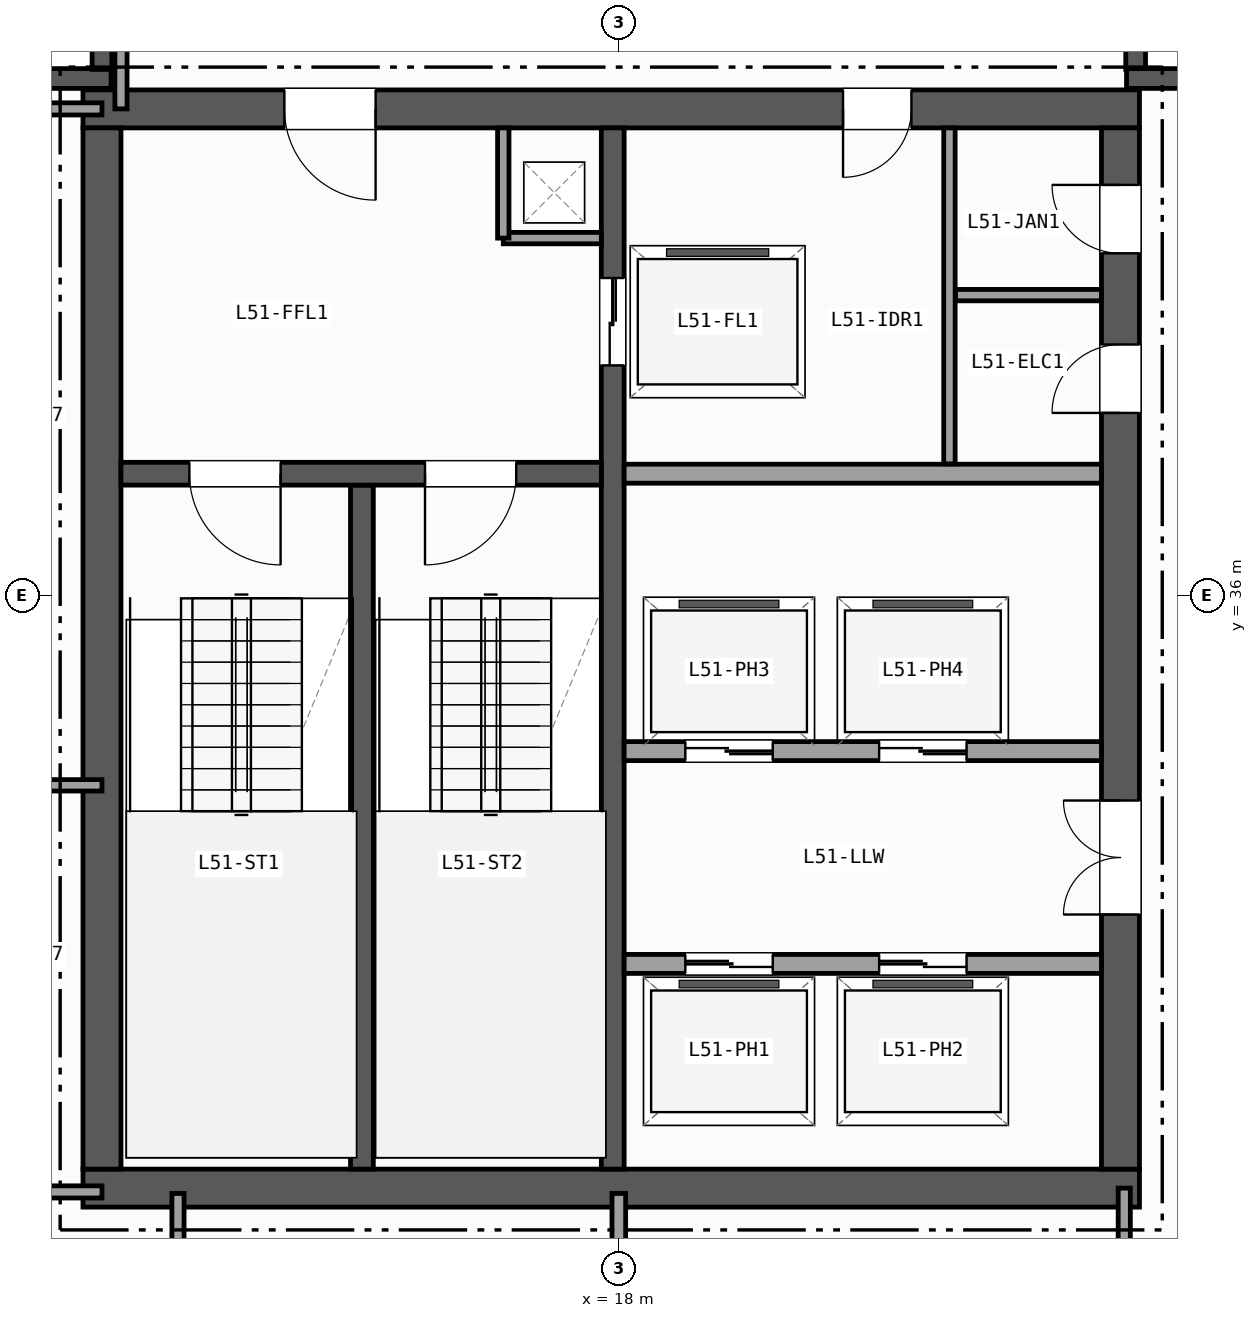
"""IFC4 building model, lengths in metres.
Left out: names, types, materials, properties, quantities, classifications, styles, units other than length and angle.
Written with IfcOpenShell. Run it as: python <this file> out.ifc"""

import sys

from ifc_helpers import new_model, si_unit, direction, frame, frame_2d, origin, place, context, subcontext, project, spatial, rectangle, extrude, element, fill, save


model = new_model("IFC4")
c1 = context("Model", 3, precision=1e-05, world=origin(), true_north=direction((0.0, 1.0)))
c2 = subcontext(c1, "Body", "Model", "MODEL_VIEW")
j1 = project(units=[si_unit("LENGTHUNIT", "METRE"), si_unit("PLANEANGLEUNIT", "RADIAN")], contexts=[c1])
p1 = place(None, origin())
s1 = spatial("IfcSite", under=j1, at=p1, CompositionType="ELEMENT")
p2 = place(p1, origin())
s2 = spatial("IfcBuilding", under=s1, at=p2, CompositionType="ELEMENT")
p3 = place(p2, frame((0.0, 0.0, 206.2)))
s3 = spatial("IfcBuildingStorey", under=s2, at=p3, CompositionType="ELEMENT", Elevation=206.2)
p4 = place(p3, frame((9.0, 42.8, 0.0), z_axis=(0.0, 0.0, 1.0), x_axis=(1.0, 0.0, 0.0)))
e1 = element("IfcWall", 1, at=p4, inside=s3, PredefinedType="SOLIDWALL", context=c2, shape_type="SweptSolid", body=[
    extrude(rectangle(XDim=2.32, YDim=0.26, at=frame_2d((1.16, 0.0))), origin(), (0.0, 0.0, 1.0), 3.42),
])
for number, where, z_axis, x_axis in (
    (2, (11.2, 42.92, 0.0), (0.0, 0.0, 1.0), (0.0, 1.0, 0.0)),
    (3, (24.8, 45.0, 0.0), (0.0, 0.0, 1.0), (0.0, -1.0, 0.0)),
):
    element("IfcWall", number, at=place(p3, frame(where, z_axis=z_axis, x_axis=x_axis)), inside=s3, PredefinedType="SOLIDWALL", context=c2, shape_type="SweptSolid", body=[
        extrude(rectangle(XDim=2.08, YDim=0.26, at=frame_2d((1.04, 0.0))), origin(), (0.0, 0.0, 1.0), 3.42),
    ])
p5 = place(p3, frame((24.68, 42.8, 0.0), z_axis=(0.0, 0.0, 1.0), x_axis=(1.0, 0.0, 0.0)))
e4 = element("IfcWall", 4, at=p5, inside=s3, PredefinedType="SOLIDWALL", context=c2, shape_type="SweptSolid", body=[
    extrude(rectangle(XDim=2.32, YDim=0.26, at=frame_2d((1.16, 0.0))), origin(), (0.0, 0.0, 1.0), 3.42),
])
p6 = place(p3, frame((10.95, 28.2, 0.0), z_axis=(0.0, 0.0, 1.0), x_axis=(1.0, 0.0, 0.0)))
e5 = element("IfcWall", 5, at=p6, inside=s3, PredefinedType="SHEAR", context=c2, shape_type="SweptSolid", body=[
    extrude(rectangle(XDim=13.9, YDim=0.5, at=frame_2d((6.95, 0.0))), origin(), (0.0, 0.0, 1.0), 3.42),
])
p7 = place(p3, frame((24.85, 42.4, 0.0), z_axis=(0.0, 0.0, 1.0), x_axis=(-1.0, 0.0, 0.0)))
e6 = element("IfcWall", 6, at=p7, inside=s3, PredefinedType="SHEAR", context=c2, shape_type="SweptSolid", body=[
    extrude(rectangle(XDim=13.9, YDim=0.5, at=frame_2d((6.95, 0.0))), origin(), (0.0, 0.0, 1.0), 3.42),
])
p8 = place(p7, frame((10.05, 0.0, 0.0)))
e7 = element("IfcOpeningElement", 7, at=p8, cuts=e6, PredefinedType="OPENING", context=c2, shape_type="SweptSolid", body=[
    extrude(rectangle(XDim=1.2, YDim=2.15, at=frame_2d((0.6, 1.075))), frame((0.0, 0.26, 0.0), z_axis=(0.0, -1.0, 0.0), x_axis=(1.0, 0.0, 0.0)), (0.0, 0.0, 1.0), 0.52),
])
p9 = place(p7, frame((3.0, 0.0, 0.0)))
e8 = element("IfcOpeningElement", 8, at=p9, cuts=e6, PredefinedType="OPENING", context=c2, shape_type="SweptSolid", body=[
    extrude(rectangle(XDim=0.9, YDim=2.1, at=frame_2d((0.45, 1.05))), frame((0.0, 0.26, 0.0), z_axis=(0.0, -1.0, 0.0), x_axis=(1.0, 0.0, 0.0)), (0.0, 0.0, 1.0), 0.52),
])
p10 = place(p3, frame((11.2, 42.15, 0.0), z_axis=(0.0, 0.0, 1.0), x_axis=(0.0, -1.0, 0.0)))
e9 = element("IfcWall", 9, at=p10, inside=s3, PredefinedType="SHEAR", context=c2, shape_type="SweptSolid", body=[
    extrude(rectangle(XDim=13.7, YDim=0.5, at=frame_2d((6.85, 0.0))), origin(), (0.0, 0.0, 1.0), 3.42),
])
p11 = place(p3, frame((24.6, 28.45, 0.0), z_axis=(0.0, 0.0, 1.0), x_axis=(0.0, 1.0, 0.0)))
e10 = element("IfcWall", 10, at=p11, inside=s3, PredefinedType="SHEAR", context=c2, shape_type="SweptSolid", body=[
    extrude(rectangle(XDim=13.7, YDim=0.5, at=frame_2d((6.85, 0.0))), origin(), (0.0, 0.0, 1.0), 3.42),
])
p12 = place(p11, frame((3.35, 0.0, 0.0)))
e11 = element("IfcOpeningElement", 11, at=p12, cuts=e10, PredefinedType="OPENING", context=c2, shape_type="SweptSolid", body=[
    extrude(rectangle(XDim=1.5, YDim=2.2, at=frame_2d((0.75, 1.1))), frame((0.0, 0.26, 0.0), z_axis=(0.0, -1.0, 0.0), x_axis=(1.0, 0.0, 0.0)), (0.0, 0.0, 1.0), 0.52),
])
p13 = place(p11, frame((9.95, 0.0, 0.0)))
e12 = element("IfcOpeningElement", 12, at=p13, cuts=e10, PredefinedType="OPENING", context=c2, shape_type="SweptSolid", body=[
    extrude(rectangle(XDim=0.9, YDim=2.1, at=frame_2d((0.45, 1.05))), frame((0.0, 0.26, 0.0), z_axis=(0.0, -1.0, 0.0), x_axis=(1.0, 0.0, 0.0)), (0.0, 0.0, 1.0), 0.52),
])
p14 = place(p11, frame((12.05, 0.0, 0.0)))
e13 = element("IfcOpeningElement", 13, at=p14, cuts=e10, PredefinedType="OPENING", context=c2, shape_type="SweptSolid", body=[
    extrude(rectangle(XDim=0.9, YDim=2.1, at=frame_2d((0.45, 1.05))), frame((0.0, 0.26, 0.0), z_axis=(0.0, -1.0, 0.0), x_axis=(1.0, 0.0, 0.0)), (0.0, 0.0, 1.0), 0.52),
])
p15 = place(p3, frame((14.62, 28.45, 0.0), z_axis=(0.0, 0.0, 1.0), x_axis=(0.0, 1.0, 0.0)))
e14 = element("IfcWall", 14, at=p15, inside=s3, PredefinedType="SHEAR", context=c2, shape_type="SweptSolid", body=[
    extrude(rectangle(XDim=9.0, YDim=0.3, at=frame_2d((4.5, 0.0))), origin(), (0.0, 0.0, 1.0), 3.42),
])
p16 = place(p3, frame((17.92, 42.15, 0.0), z_axis=(0.0, 0.0, 1.0), x_axis=(0.0, -1.0, 0.0)))
e15 = element("IfcWall", 15, at=p16, inside=s3, PredefinedType="SHEAR", context=c2, shape_type="SweptSolid", body=[
    extrude(rectangle(XDim=13.7, YDim=0.3, at=frame_2d((6.85, 0.0))), origin(), (0.0, 0.0, 1.0), 3.42),
])
p17 = place(p16, frame((1.975, 0.0, 0.0)))
e16 = element("IfcOpeningElement", 16, at=p17, cuts=e15, PredefinedType="OPENING", context=c2, shape_type="SweptSolid", body=[
    extrude(rectangle(XDim=1.15, YDim=2.15, at=frame_2d((0.575, 1.075))), frame((0.0, 0.16, 0.0), z_axis=(0.0, -1.0, 0.0), x_axis=(1.0, 0.0, 0.0)), (0.0, 0.0, 1.0), 0.32),
])
p18 = place(p3, frame((17.77, 37.6, 0.0), z_axis=(0.0, 0.0, 1.0), x_axis=(-1.0, 0.0, 0.0)))
e17 = element("IfcWall", 17, at=p18, inside=s3, PredefinedType="SHEAR", context=c2, shape_type="SweptSolid", body=[
    extrude(rectangle(XDim=6.32, YDim=0.3, at=frame_2d((3.16, 0.0))), origin(), (0.0, 0.0, 1.0), 3.42),
])
p19 = place(p18, frame((4.22, 0.0, 0.0)))
e18 = element("IfcOpeningElement", 18, at=p19, cuts=e17, PredefinedType="OPENING", context=c2, shape_type="SweptSolid", body=[
    extrude(rectangle(XDim=1.2, YDim=2.15, at=frame_2d((0.6, 1.075))), frame((0.0, 0.16, 0.0), z_axis=(0.0, -1.0, 0.0), x_axis=(1.0, 0.0, 0.0)), (0.0, 0.0, 1.0), 0.32),
])
p20 = place(p18, frame((1.12, 0.0, 0.0)))
e19 = element("IfcOpeningElement", 19, at=p20, cuts=e17, PredefinedType="OPENING", context=c2, shape_type="SweptSolid", body=[
    extrude(rectangle(XDim=1.2, YDim=2.15, at=frame_2d((0.6, 1.075))), frame((0.0, 0.16, 0.0), z_axis=(0.0, -1.0, 0.0), x_axis=(1.0, 0.0, 0.0)), (0.0, 0.0, 1.0), 0.32),
])
p21 = place(p3, frame((16.48, 40.7, 0.0), z_axis=(0.0, 0.0, 1.0), x_axis=(1.0, 0.0, 0.0)))
e20 = element("IfcWall", 20, at=p21, inside=s3, PredefinedType="PARTITIONING", context=c2, shape_type="SweptSolid", body=[
    extrude(rectangle(XDim=1.29, YDim=0.15, at=frame_2d((0.645, 0.0))), origin(), (0.0, 0.0, 1.0), 3.42),
])
p22 = place(p3, frame((16.48, 40.7, 0.0), z_axis=(0.0, 0.0, 1.0), x_axis=(0.0, 1.0, 0.0)))
e21 = element("IfcWall", 21, at=p22, inside=s3, PredefinedType="PARTITIONING", context=c2, shape_type="SweptSolid", body=[
    extrude(rectangle(XDim=1.45, YDim=0.15, at=frame_2d((0.725, 0.0))), origin(), (0.0, 0.0, 1.0), 3.42),
])
p23 = place(p3, frame((18.07, 37.6, 0.0), z_axis=(0.0, 0.0, 1.0), x_axis=(1.0, 0.0, 0.0)))
e22 = element("IfcWall", 22, at=p23, inside=s3, PredefinedType="PARTITIONING", context=c2, shape_type="SweptSolid", body=[
    extrude(rectangle(XDim=6.28, YDim=0.25, at=frame_2d((3.14, 0.0))), origin(), (0.0, 0.0, 1.0), 3.42),
])
p24 = place(p3, frame((18.07, 31.15, 0.0), z_axis=(0.0, 0.0, 1.0), x_axis=(1.0, 0.0, 0.0)))
e23 = element("IfcWall", 23, at=p24, inside=s3, PredefinedType="PARTITIONING", context=c2, shape_type="SweptSolid", body=[
    extrude(rectangle(XDim=6.28, YDim=0.25, at=frame_2d((3.14, 0.0))), origin(), (0.0, 0.0, 1.0), 3.42),
])
p25 = place(p24, frame((0.805, 0.0, 0.0)))
e24 = element("IfcOpeningElement", 24, at=p25, cuts=e23, PredefinedType="OPENING", context=c2, shape_type="SweptSolid", body=[
    extrude(rectangle(XDim=1.15, YDim=2.15, at=frame_2d((0.575, 1.075))), frame((0.0, 0.135, 0.0), z_axis=(0.0, -1.0, 0.0), x_axis=(1.0, 0.0, 0.0)), (0.0, 0.0, 1.0), 0.27),
])
p26 = place(p24, frame((3.355, 0.0, 0.0)))
e25 = element("IfcOpeningElement", 25, at=p26, cuts=e23, PredefinedType="OPENING", context=c2, shape_type="SweptSolid", body=[
    extrude(rectangle(XDim=1.15, YDim=2.15, at=frame_2d((0.575, 1.075))), frame((0.0, 0.135, 0.0), z_axis=(0.0, -1.0, 0.0), x_axis=(1.0, 0.0, 0.0)), (0.0, 0.0, 1.0), 0.27),
])
p27 = place(p3, frame((24.35, 33.95, 0.0), z_axis=(0.0, 0.0, 1.0), x_axis=(-1.0, 0.0, 0.0)))
e26 = element("IfcWall", 26, at=p27, inside=s3, PredefinedType="PARTITIONING", context=c2, shape_type="SweptSolid", body=[
    extrude(rectangle(XDim=6.28, YDim=0.25, at=frame_2d((3.14, 0.0))), origin(), (0.0, 0.0, 1.0), 3.42),
])
p28 = place(p27, frame((4.325, 0.0, 0.0)))
e27 = element("IfcOpeningElement", 27, at=p28, cuts=e26, PredefinedType="OPENING", context=c2, shape_type="SweptSolid", body=[
    extrude(rectangle(XDim=1.15, YDim=2.15, at=frame_2d((0.575, 1.075))), frame((0.0, 0.135, 0.0), z_axis=(0.0, -1.0, 0.0), x_axis=(1.0, 0.0, 0.0)), (0.0, 0.0, 1.0), 0.27),
])
p29 = place(p27, frame((1.775, 0.0, 0.0)))
e28 = element("IfcOpeningElement", 28, at=p29, cuts=e26, PredefinedType="OPENING", context=c2, shape_type="SweptSolid", body=[
    extrude(rectangle(XDim=1.15, YDim=2.15, at=frame_2d((0.575, 1.075))), frame((0.0, 0.135, 0.0), z_axis=(0.0, -1.0, 0.0), x_axis=(1.0, 0.0, 0.0)), (0.0, 0.0, 1.0), 0.27),
])
p30 = place(p3, frame((22.35, 37.73, 0.0), z_axis=(0.0, 0.0, 1.0), x_axis=(0.0, 1.0, 0.0)))
e29 = element("IfcWall", 29, at=p30, inside=s3, PredefinedType="PARTITIONING", context=c2, shape_type="SweptSolid", body=[
    extrude(rectangle(XDim=4.42, YDim=0.15, at=frame_2d((2.21, 0.0))), origin(), (0.0, 0.0, 1.0), 3.42),
])
p31 = place(p3, frame((22.43, 39.95, 0.0), z_axis=(0.0, 0.0, 1.0), x_axis=(1.0, 0.0, 0.0)))
e30 = element("IfcWall", 30, at=p31, inside=s3, PredefinedType="PARTITIONING", context=c2, shape_type="SweptSolid", body=[
    extrude(rectangle(XDim=1.92, YDim=0.15, at=frame_2d((0.96, 0.0))), origin(), (0.0, 0.0, 1.0), 3.42),
])
p32 = place(p3, frame((9.0, 28.15, 0.0), z_axis=(0.0, 0.0, 1.0), x_axis=(1.0, 0.0, 0.0)))
e31 = element("IfcWall", 31, at=p32, inside=s3, PredefinedType="PARTITIONING", context=c2, shape_type="SweptSolid", body=[
    extrude(rectangle(XDim=2.2, YDim=0.16, at=frame_2d((1.1, 0.0))), origin(), (0.0, 0.0, 1.0), 2.707),
])
p33 = place(p32, frame((0.45, 0.0, 0.0)))
e32 = element("IfcOpeningElement", 32, at=p33, cuts=e31, PredefinedType="OPENING", context=c2, shape_type="SweptSolid", body=[
    extrude(rectangle(XDim=0.95, YDim=2.1, at=frame_2d((0.475, 1.05))), frame((0.0, 0.09, 0.0), z_axis=(0.0, -1.0, 0.0), x_axis=(1.0, 0.0, 0.0)), (0.0, 0.0, 1.0), 0.18),
])
p34 = place(p3, frame((9.0, 42.4, 0.0), z_axis=(0.0, 0.0, 1.0), x_axis=(1.0, 0.0, 0.0)))
e33 = element("IfcWall", 33, at=p34, inside=s3, PredefinedType="PARTITIONING", context=c2, shape_type="SweptSolid", body=[
    extrude(rectangle(XDim=2.2, YDim=0.16, at=frame_2d((1.1, 0.0))), origin(), (0.0, 0.0, 1.0), 3.42),
])
p35 = place(p3, frame((11.45, 42.4, 0.0), z_axis=(0.0, 0.0, 1.0), x_axis=(0.0, 1.0, 0.0)))
e34 = element("IfcWall", 34, at=p35, inside=s3, PredefinedType="PARTITIONING", context=c2, shape_type="SweptSolid", body=[
    extrude(rectangle(XDim=2.666, YDim=0.16, at=frame_2d((1.333, 0.0))), origin(), (0.0, 0.0, 1.0), 3.42),
])
p36 = place(p3, frame((9.0, 33.5, 0.0), z_axis=(0.0, 0.0, 1.0), x_axis=(1.0, 0.0, 0.0)))
e35 = element("IfcWall", 35, at=p36, inside=s3, PredefinedType="PARTITIONING", context=c2, shape_type="SweptSolid", body=[
    extrude(rectangle(XDim=2.2, YDim=0.15, at=frame_2d((1.1, 0.0))), origin(), (0.0, 0.0, 1.0), 2.707),
])
p37 = place(p36, frame((0.45, 0.0, 0.0)))
e36 = element("IfcOpeningElement", 36, at=p37, cuts=e35, PredefinedType="OPENING", context=c2, shape_type="SweptSolid", body=[
    extrude(rectangle(XDim=0.9, YDim=2.1, at=frame_2d((0.45, 1.05))), frame((0.0, 0.085, 0.0), z_axis=(0.0, -1.0, 0.0), x_axis=(1.0, 0.0, 0.0)), (0.0, 0.0, 1.0), 0.17),
])
p38 = place(p3, frame((24.65, 9.0, 0.0), z_axis=(0.0, 0.0, 1.0), x_axis=(0.0, 1.0, 0.0)))
e37 = element("IfcWall", 37, at=p38, inside=s3, PredefinedType="PARTITIONING", context=c2, shape_type="SweptSolid", body=[
    extrude(rectangle(XDim=19.2, YDim=0.16, at=frame_2d((9.6, 0.0))), origin(), (0.0, 0.0, 1.0), 2.707),
])
p39 = place(p38, frame((7.0, 0.0, 0.0)))
e38 = element("IfcOpeningElement", 38, at=p39, cuts=e37, PredefinedType="OPENING", context=c2, shape_type="SweptSolid", body=[
    extrude(rectangle(XDim=1.05, YDim=2.15, at=frame_2d((0.525, 1.075))), frame((0.0, 0.09, 0.0), z_axis=(0.0, -1.0, 0.0), x_axis=(1.0, 0.0, 0.0)), (0.0, 0.0, 1.0), 0.18),
])
p40 = place(p38, frame((2.55, 0.0, 0.0)))
e39 = element("IfcOpeningElement", 39, at=p40, cuts=e37, PredefinedType="OPENING", context=c2, shape_type="SweptSolid", body=[
    extrude(rectangle(XDim=1.2, YDim=2.15, at=frame_2d((0.6, 1.075))), frame((0.0, 0.09, 0.0), z_axis=(0.0, -1.0, 0.0), x_axis=(1.0, 0.0, 0.0)), (0.0, 0.0, 1.0), 0.18),
])
p41 = place(p3, frame((18.0, 14.2, 0.0), z_axis=(0.0, 0.0, 1.0), x_axis=(0.0, 1.0, 0.0)))
e40 = element("IfcWall", 40, at=p41, inside=s3, PredefinedType="PARTITIONING", context=c2, shape_type="SweptSolid", body=[
    extrude(rectangle(XDim=13.93, YDim=0.18, at=frame_2d((6.965, 0.0))), origin(), (0.0, 0.0, 1.0), 2.789),
])
p42 = place(p41, frame((7.3, 0.0, 0.0)))
e41 = element("IfcOpeningElement", 41, at=p42, cuts=e40, PredefinedType="OPENING", context=c2, shape_type="SweptSolid", body=[
    extrude(rectangle(XDim=0.86, YDim=2.05, at=frame_2d((0.43, 1.025))), frame((0.0, 0.1, 0.0), z_axis=(0.0, -1.0, 0.0), x_axis=(1.0, 0.0, 0.0)), (0.0, 0.0, 1.0), 0.2),
])
p43 = place(p3, frame((12.2, 18.0, 0.0), z_axis=(0.0, 0.0, 1.0), x_axis=(0.0, 1.0, 0.0)))
e42 = element("IfcWall", 42, at=p43, inside=s3, PredefinedType="PARTITIONING", context=c2, shape_type="SweptSolid", body=[
    extrude(rectangle(XDim=10.13, YDim=0.16, at=frame_2d((5.065, 0.0))), origin(), (0.0, 0.0, 1.0), 2.789),
])
p44 = place(p43, frame((2.5, 0.0, 0.0)))
e43 = element("IfcOpeningElement", 43, at=p44, cuts=e42, PredefinedType="OPENING", context=c2, shape_type="SweptSolid", body=[
    extrude(rectangle(XDim=0.95, YDim=2.1, at=frame_2d((0.475, 1.05))), frame((0.0, 0.09, 0.0), z_axis=(0.0, -1.0, 0.0), x_axis=(1.0, 0.0, 0.0)), (0.0, 0.0, 1.0), 0.18),
])
p45 = place(p19, origin())
e44 = element("IfcDoor", 44, at=p45, inside=s3, OperationType="SINGLE_SWING_LEFT", PredefinedType="DOOR", context=c2, shape_type="SweptSolid", body=[
    extrude(rectangle(XDim=1.2, YDim=2.15, at=frame_2d((0.6, 1.075))), frame((0.0, 0.025, 0.0), z_axis=(0.0, -1.0, 0.0), x_axis=(1.0, 0.0, 0.0)), (0.0, 0.0, 1.0), 0.05),
])
fill(e18, e44)
p46 = place(p20, origin())
e45 = element("IfcDoor", 45, at=p46, inside=s3, OperationType="SINGLE_SWING_RIGHT", PredefinedType="DOOR", context=c2, shape_type="SweptSolid", body=[
    extrude(rectangle(XDim=1.2, YDim=2.15, at=frame_2d((0.6, 1.075))), frame((0.0, 0.025, 0.0), z_axis=(0.0, -1.0, 0.0), x_axis=(1.0, 0.0, 0.0)), (0.0, 0.0, 1.0), 0.05),
])
fill(e19, e45)
p47 = place(p12, origin())
e46 = element("IfcDoor", 46, at=p47, inside=s3, OperationType="DOUBLE_DOOR_SINGLE_SWING", PredefinedType="DOOR", context=c2, shape_type="SweptSolid", body=[
    extrude(rectangle(XDim=1.5, YDim=2.2, at=frame_2d((0.75, 1.1))), frame((0.0, 0.025, 0.0), z_axis=(0.0, -1.0, 0.0), x_axis=(1.0, 0.0, 0.0)), (0.0, 0.0, 1.0), 0.05),
])
fill(e11, e46)
p48 = place(p8, origin())
e47 = element("IfcDoor", 47, at=p48, inside=s3, OperationType="SINGLE_SWING_LEFT", PredefinedType="DOOR", context=c2, shape_type="SweptSolid", body=[
    extrude(rectangle(XDim=1.2, YDim=2.15, at=frame_2d((0.6, 1.075))), frame((0.0, 0.025, 0.0), z_axis=(0.0, -1.0, 0.0), x_axis=(1.0, 0.0, 0.0)), (0.0, 0.0, 1.0), 0.05),
])
fill(e7, e47)
p49 = place(p13, origin())
e48 = element("IfcDoor", 48, at=p49, inside=s3, OperationType="SINGLE_SWING_LEFT", PredefinedType="DOOR", context=c2, shape_type="SweptSolid", body=[
    extrude(rectangle(XDim=0.9, YDim=2.1, at=frame_2d((0.45, 1.05))), frame((0.0, 0.025, 0.0), z_axis=(0.0, -1.0, 0.0), x_axis=(1.0, 0.0, 0.0)), (0.0, 0.0, 1.0), 0.05),
])
fill(e12, e48)
p50 = place(p9, origin())
e49 = element("IfcDoor", 49, at=p50, inside=s3, OperationType="SINGLE_SWING_RIGHT", PredefinedType="DOOR", context=c2, shape_type="SweptSolid", body=[
    extrude(rectangle(XDim=0.9, YDim=2.1, at=frame_2d((0.45, 1.05))), frame((0.0, 0.025, 0.0), z_axis=(0.0, -1.0, 0.0), x_axis=(1.0, 0.0, 0.0)), (0.0, 0.0, 1.0), 0.05),
])
fill(e8, e49)
p51 = place(p14, origin())
e50 = element("IfcDoor", 50, at=p51, inside=s3, OperationType="SINGLE_SWING_RIGHT", PredefinedType="DOOR", context=c2, shape_type="SweptSolid", body=[
    extrude(rectangle(XDim=0.9, YDim=2.1, at=frame_2d((0.45, 1.05))), frame((0.0, 0.025, 0.0), z_axis=(0.0, -1.0, 0.0), x_axis=(1.0, 0.0, 0.0)), (0.0, 0.0, 1.0), 0.05),
])
fill(e13, e50)
p52 = place(p17, origin())
e51 = element("IfcDoor", 51, at=p52, inside=s3, OperationType="DOUBLE_DOOR_SLIDING", PredefinedType="DOOR", context=c2, shape_type="SweptSolid", body=[
    extrude(rectangle(XDim=1.15, YDim=2.15, at=frame_2d((0.575, 1.075))), frame((0.0, 0.025, 0.0), z_axis=(0.0, -1.0, 0.0), x_axis=(1.0, 0.0, 0.0)), (0.0, 0.0, 1.0), 0.05),
])
fill(e16, e51)
p53 = place(p25, origin())
e52 = element("IfcDoor", 52, at=p53, inside=s3, OperationType="DOUBLE_DOOR_SLIDING", PredefinedType="DOOR", context=c2, shape_type="SweptSolid", body=[
    extrude(rectangle(XDim=1.15, YDim=2.15, at=frame_2d((0.575, 1.075))), frame((0.0, 0.025, 0.0), z_axis=(0.0, -1.0, 0.0), x_axis=(1.0, 0.0, 0.0)), (0.0, 0.0, 1.0), 0.05),
])
fill(e24, e52)
p54 = place(p26, origin())
e53 = element("IfcDoor", 53, at=p54, inside=s3, OperationType="DOUBLE_DOOR_SLIDING", PredefinedType="DOOR", context=c2, shape_type="SweptSolid", body=[
    extrude(rectangle(XDim=1.15, YDim=2.15, at=frame_2d((0.575, 1.075))), frame((0.0, 0.025, 0.0), z_axis=(0.0, -1.0, 0.0), x_axis=(1.0, 0.0, 0.0)), (0.0, 0.0, 1.0), 0.05),
])
fill(e25, e53)
p55 = place(p28, origin())
e54 = element("IfcDoor", 54, at=p55, inside=s3, OperationType="DOUBLE_DOOR_SLIDING", PredefinedType="DOOR", context=c2, shape_type="SweptSolid", body=[
    extrude(rectangle(XDim=1.15, YDim=2.15, at=frame_2d((0.575, 1.075))), frame((0.0, 0.025, 0.0), z_axis=(0.0, -1.0, 0.0), x_axis=(1.0, 0.0, 0.0)), (0.0, 0.0, 1.0), 0.05),
])
fill(e27, e54)
p56 = place(p29, origin())
e55 = element("IfcDoor", 55, at=p56, inside=s3, OperationType="DOUBLE_DOOR_SLIDING", PredefinedType="DOOR", context=c2, shape_type="SweptSolid", body=[
    extrude(rectangle(XDim=1.15, YDim=2.15, at=frame_2d((0.575, 1.075))), frame((0.0, 0.025, 0.0), z_axis=(0.0, -1.0, 0.0), x_axis=(1.0, 0.0, 0.0)), (0.0, 0.0, 1.0), 0.05),
])
fill(e28, e55)
save(model, sys.argv[1])
